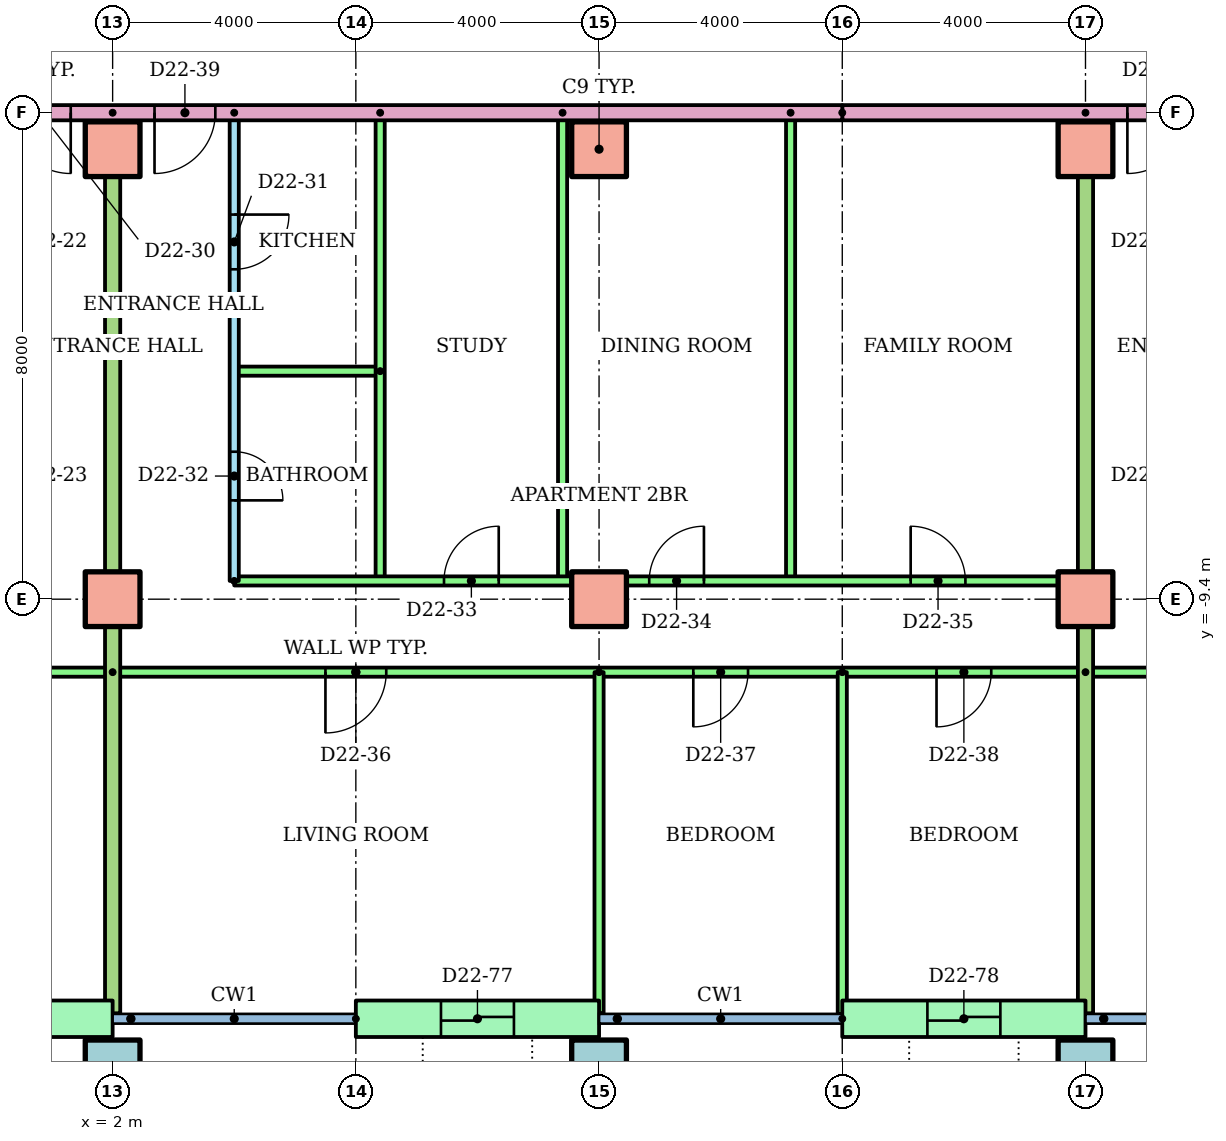
"""IFC4 building model, lengths in metres.
Left out: names, types, materials, properties, quantities, classifications, styles, units other than length and angle.
Written with IfcOpenShell. Run it as: python <this file> out.ifc"""

import sys

from ifc_helpers import new_model, si_unit, direction, frame, frame_2d, origin, origin_2d, place, context, subcontext, project, spatial, rectangle, hollow_rectangle, extrude, element, fill, save


model = new_model("IFC4")
c1 = context("Model", 3, precision=1e-05, world=origin(), true_north=direction((0.0, 1.0)))
c2 = subcontext(c1, "Body", "Model", "MODEL_VIEW")
j1 = project(units=[si_unit("LENGTHUNIT", "METRE"), si_unit("PLANEANGLEUNIT", "RADIAN")], contexts=[c1])
p1 = place(None, origin())
s1 = spatial("IfcSite", under=j1, at=p1, CompositionType="ELEMENT")
p2 = place(p1, origin())
s2 = spatial("IfcBuilding", under=s1, at=p2, CompositionType="ELEMENT")
p3 = place(p2, frame((0.0, 0.0, 87.1)))
s3 = spatial("IfcBuildingStorey", under=s2, at=p3, CompositionType="ELEMENT", Elevation=87.1)
for number, where in (
    (1, (2.0, -17.1, 0.0)),
    (2, (10.0, -17.1, 0.0)),
    (3, (18.0, -17.1, 0.0)),
):
    element("IfcColumn", number, at=place(p3, frame(where)), inside=s3, PredefinedType="COLUMN", context=c2, shape_type="SweptSolid", body=[
        extrude(hollow_rectangle(XDim=0.9, YDim=0.9, WallThickness=0.045, at=origin_2d()), origin(), (0.0, 0.0, 1.0), 3.2),
    ])
for number, where in (
    (4, (2.0, -9.4, 0.0)),
    (5, (10.0, -9.4, 0.0)),
    (6, (18.0, -9.4, 0.0)),
    (7, (2.0, -2.0, 0.0)),
    (8, (10.0, -2.0, 0.0)),
    (9, (18.0, -2.0, 0.0)),
):
    element("IfcColumn", number, at=place(p3, frame(where)), inside=s3, PredefinedType="COLUMN", context=c2, shape_type="SweptSolid", body=[
        extrude(rectangle(XDim=0.9, YDim=0.9, at=origin_2d()), origin(), (0.0, 0.0, 1.0), 3.2),
    ])
p4 = place(p3, frame((-2.0, -16.3, 0.0)))
e10 = element("IfcWall", 10, at=p4, inside=s3, PredefinedType="STANDARD", context=c2, shape_type="SweptSolid", body=[
    extrude(rectangle(XDim=4.0, YDim=0.6, at=frame_2d((2.0, 0.0))), origin(), (0.0, 0.0, 1.0), 2.92),
])
p5 = place(p4, frame((1.4, 0.0, 0.0)))
e11 = element("IfcOpeningElement", 11, at=p5, cuts=e10, PredefinedType="OPENING", context=c2, shape_type="SweptSolid", body=[
    extrude(rectangle(XDim=1.2, YDim=2.1, at=frame_2d((0.6, 1.05))), frame((0.0, 0.31, 0.0), z_axis=(0.0, -1.0, 0.0), x_axis=(1.0, 0.0, 0.0)), (0.0, 0.0, 1.0), 0.62),
])
p6 = place(p3, frame((6.0, -16.3, 0.0)))
e12 = element("IfcWall", 12, at=p6, inside=s3, PredefinedType="STANDARD", context=c2, shape_type="SweptSolid", body=[
    extrude(rectangle(XDim=4.0, YDim=0.6, at=frame_2d((2.0, 0.0))), origin(), (0.0, 0.0, 1.0), 2.92),
])
p7 = place(p6, frame((1.4, 0.0, 0.0)))
e13 = element("IfcOpeningElement", 13, at=p7, cuts=e12, PredefinedType="OPENING", context=c2, shape_type="SweptSolid", body=[
    extrude(rectangle(XDim=1.2, YDim=2.1, at=frame_2d((0.6, 1.05))), frame((0.0, 0.31, 0.0), z_axis=(0.0, -1.0, 0.0), x_axis=(1.0, 0.0, 0.0)), (0.0, 0.0, 1.0), 0.62),
])
p8 = place(p3, frame((14.0, -16.3, 0.0)))
e14 = element("IfcWall", 14, at=p8, inside=s3, PredefinedType="STANDARD", context=c2, shape_type="SweptSolid", body=[
    extrude(rectangle(XDim=4.0, YDim=0.6, at=frame_2d((2.0, 0.0))), origin(), (0.0, 0.0, 1.0), 2.92),
])
p9 = place(p8, frame((1.4, 0.0, 0.0)))
e15 = element("IfcOpeningElement", 15, at=p9, cuts=e14, PredefinedType="OPENING", context=c2, shape_type="SweptSolid", body=[
    extrude(rectangle(XDim=1.2, YDim=2.1, at=frame_2d((0.6, 1.05))), frame((0.0, 0.31, 0.0), z_axis=(0.0, -1.0, 0.0), x_axis=(1.0, 0.0, 0.0)), (0.0, 0.0, 1.0), 0.62),
])
p10 = place(p3, frame((2.0, -10.6, 0.0), z_axis=(0.0, 0.0, 1.0), x_axis=(-1.0, 0.0, 0.0)))
e16 = element("IfcWall", 16, at=p10, inside=s3, PredefinedType="PARTITIONING", context=c2, shape_type="SweptSolid", body=[
    extrude(rectangle(XDim=16.0, YDim=0.15, at=frame_2d((8.0, 0.0))), origin(), (0.0, 0.0, 1.0), 2.4),
])
p11 = place(p10, frame((13.55, 0.0, 0.0)))
e17 = element("IfcOpeningElement", 17, at=p11, cuts=e16, PredefinedType="OPENING", context=c2, shape_type="SweptSolid", body=[
    extrude(rectangle(XDim=0.9, YDim=2.1, at=frame_2d((0.45, 1.05))), frame((0.0, 0.085, 0.0), z_axis=(0.0, -1.0, 0.0), x_axis=(1.0, 0.0, 0.0)), (0.0, 0.0, 1.0), 0.17),
])
p12 = place(p10, frame((9.55, 0.0, 0.0)))
e18 = element("IfcOpeningElement", 18, at=p12, cuts=e16, PredefinedType="OPENING", context=c2, shape_type="SweptSolid", body=[
    extrude(rectangle(XDim=0.9, YDim=2.1, at=frame_2d((0.45, 1.05))), frame((0.0, 0.085, 0.0), z_axis=(0.0, -1.0, 0.0), x_axis=(1.0, 0.0, 0.0)), (0.0, 0.0, 1.0), 0.17),
])
p13 = place(p10, frame((3.5, 0.0, 0.0)))
e19 = element("IfcOpeningElement", 19, at=p13, cuts=e16, PredefinedType="OPENING", context=c2, shape_type="SweptSolid", body=[
    extrude(rectangle(XDim=1.0, YDim=2.1, at=frame_2d((0.5, 1.05))), frame((0.0, 0.085, 0.0), z_axis=(0.0, -1.0, 0.0), x_axis=(1.0, 0.0, 0.0)), (0.0, 0.0, 1.0), 0.17),
])
p14 = place(p3, frame((4.0, -1.4, 0.0), z_axis=(0.0, 0.0, 1.0), x_axis=(0.0, -1.0, 0.0)))
e20 = element("IfcWall", 20, at=p14, inside=s3, PredefinedType="PARTITIONING", context=c2, shape_type="SweptSolid", body=[
    extrude(rectangle(XDim=7.7, YDim=0.15, at=frame_2d((3.85, 0.0))), origin(), (0.0, 0.0, 1.0), 2.4),
])
p15 = place(p14, frame((1.675, 0.0, 0.0)))
e21 = element("IfcOpeningElement", 21, at=p15, cuts=e20, PredefinedType="OPENING", context=c2, shape_type="SweptSolid", body=[
    extrude(rectangle(XDim=0.9, YDim=2.1, at=frame_2d((0.45, 1.05))), frame((0.0, 0.085, 0.0), z_axis=(0.0, -1.0, 0.0), x_axis=(1.0, 0.0, 0.0)), (0.0, 0.0, 1.0), 0.17),
])
p16 = place(p14, frame((5.575, 0.0, 0.0)))
e22 = element("IfcOpeningElement", 22, at=p16, cuts=e20, PredefinedType="OPENING", context=c2, shape_type="SweptSolid", body=[
    extrude(rectangle(XDim=0.8, YDim=2.1, at=frame_2d((0.4, 1.05))), frame((0.0, 0.085, 0.0), z_axis=(0.0, -1.0, 0.0), x_axis=(1.0, 0.0, 0.0)), (0.0, 0.0, 1.0), 0.17),
])
p17 = place(p3, frame((6.4, -5.65, 0.0), z_axis=(0.0, 0.0, 1.0), x_axis=(-1.0, 0.0, 0.0)))
e23 = element("IfcWall", 23, at=p17, inside=s3, PredefinedType="PARTITIONING", context=c2, shape_type="SweptSolid", body=[
    extrude(rectangle(XDim=2.4, YDim=0.15, at=frame_2d((1.2, 0.0))), origin(), (0.0, 0.0, 1.0), 2.4),
])
for number, where, z_axis, x_axis in (
    (24, (6.4, -1.4, 0.0), (0.0, 0.0, 1.0), (0.0, -1.0, 0.0)),
    (25, (9.4, -1.4, 0.0), (0.0, 0.0, 1.0), (0.0, -1.0, 0.0)),
    (26, (13.15, -1.4, 0.0), (0.0, 0.0, 1.0), (0.0, -1.0, 0.0)),
):
    element("IfcWall", number, at=place(p3, frame(where, z_axis=z_axis, x_axis=x_axis)), inside=s3, PredefinedType="PARTITIONING", context=c2, shape_type="SweptSolid", body=[
        extrude(rectangle(XDim=7.7, YDim=0.15, at=frame_2d((3.85, 0.0))), origin(), (0.0, 0.0, 1.0), 2.4),
    ])
p18 = place(p3, frame((4.0, -9.1, 0.0)))
e27 = element("IfcWall", 27, at=p18, inside=s3, PredefinedType="PARTITIONING", context=c2, shape_type="SweptSolid", body=[
    extrude(rectangle(XDim=14.0, YDim=0.15, at=frame_2d((7.0, 0.0))), origin(), (0.0, 0.0, 1.0), 2.4),
])
p19 = place(p18, frame((3.45, 0.0, 0.0)))
e28 = element("IfcOpeningElement", 28, at=p19, cuts=e27, PredefinedType="OPENING", context=c2, shape_type="SweptSolid", body=[
    extrude(rectangle(XDim=0.9, YDim=2.1, at=frame_2d((0.45, 1.05))), frame((0.0, 0.085, 0.0), z_axis=(0.0, -1.0, 0.0), x_axis=(1.0, 0.0, 0.0)), (0.0, 0.0, 1.0), 0.17),
])
p20 = place(p18, frame((6.825, 0.0, 0.0)))
e29 = element("IfcOpeningElement", 29, at=p20, cuts=e27, PredefinedType="OPENING", context=c2, shape_type="SweptSolid", body=[
    extrude(rectangle(XDim=0.9, YDim=2.1, at=frame_2d((0.45, 1.05))), frame((0.0, 0.085, 0.0), z_axis=(0.0, -1.0, 0.0), x_axis=(1.0, 0.0, 0.0)), (0.0, 0.0, 1.0), 0.17),
])
p21 = place(p18, frame((11.125, 0.0, 0.0)))
e30 = element("IfcOpeningElement", 30, at=p21, cuts=e27, PredefinedType="OPENING", context=c2, shape_type="SweptSolid", body=[
    extrude(rectangle(XDim=0.9, YDim=2.1, at=frame_2d((0.45, 1.05))), frame((0.0, 0.085, 0.0), z_axis=(0.0, -1.0, 0.0), x_axis=(1.0, 0.0, 0.0)), (0.0, 0.0, 1.0), 0.17),
])
p22 = place(p3, frame((18.0, -10.6, 0.0), z_axis=(0.0, 0.0, 1.0), x_axis=(-1.0, 0.0, 0.0)))
e31 = element("IfcWall", 31, at=p22, inside=s3, PredefinedType="PARTITIONING", context=c2, shape_type="SweptSolid", body=[
    extrude(rectangle(XDim=16.0, YDim=0.15, at=frame_2d((8.0, 0.0))), origin(), (0.0, 0.0, 1.0), 2.4),
])
p23 = place(p22, frame((11.5, 0.0, 0.0)))
e32 = element("IfcOpeningElement", 32, at=p23, cuts=e31, PredefinedType="OPENING", context=c2, shape_type="SweptSolid", body=[
    extrude(rectangle(XDim=1.0, YDim=2.1, at=frame_2d((0.5, 1.05))), frame((0.0, 0.085, 0.0), z_axis=(0.0, -1.0, 0.0), x_axis=(1.0, 0.0, 0.0)), (0.0, 0.0, 1.0), 0.17),
])
p24 = place(p22, frame((5.55, 0.0, 0.0)))
e33 = element("IfcOpeningElement", 33, at=p24, cuts=e31, PredefinedType="OPENING", context=c2, shape_type="SweptSolid", body=[
    extrude(rectangle(XDim=0.9, YDim=2.1, at=frame_2d((0.45, 1.05))), frame((0.0, 0.085, 0.0), z_axis=(0.0, -1.0, 0.0), x_axis=(1.0, 0.0, 0.0)), (0.0, 0.0, 1.0), 0.17),
])
p25 = place(p22, frame((1.55, 0.0, 0.0)))
e34 = element("IfcOpeningElement", 34, at=p25, cuts=e31, PredefinedType="OPENING", context=c2, shape_type="SweptSolid", body=[
    extrude(rectangle(XDim=0.9, YDim=2.1, at=frame_2d((0.45, 1.05))), frame((0.0, 0.085, 0.0), z_axis=(0.0, -1.0, 0.0), x_axis=(1.0, 0.0, 0.0)), (0.0, 0.0, 1.0), 0.17),
])
p26 = place(p3, frame((10.0, -10.6, 0.0), z_axis=(0.0, 0.0, 1.0), x_axis=(0.0, -1.0, 0.0)))
e35 = element("IfcWall", 35, at=p26, inside=s3, PredefinedType="PARTITIONING", context=c2, shape_type="SweptSolid", body=[
    extrude(rectangle(XDim=5.61, YDim=0.15, at=frame_2d((2.805, 0.0))), origin(), (0.0, 0.0, 1.0), 2.4),
])
p27 = place(p3, frame((14.0, -10.6, 0.0), z_axis=(0.0, 0.0, 1.0), x_axis=(0.0, -1.0, 0.0)))
e36 = element("IfcWall", 36, at=p27, inside=s3, PredefinedType="PARTITIONING", context=c2, shape_type="SweptSolid", body=[
    extrude(rectangle(XDim=5.621, YDim=0.15, at=frame_2d((2.811, 0.0))), origin(), (0.0, 0.0, 1.0), 2.4),
])
p28 = place(p3, frame((2.0, -1.4, 0.0), z_axis=(0.0, 0.0, 1.0), x_axis=(0.0, -1.0, 0.0)))
e37 = element("IfcWall", 37, at=p28, inside=s3, PredefinedType="PARTITIONING", context=c2, shape_type="SweptSolid", body=[
    extrude(rectangle(XDim=14.81, YDim=0.25, at=frame_2d((7.405, 0.0))), origin(), (0.0, 0.0, 1.0), 2.4),
])
p29 = place(p3, frame((40.62, -10.6, 0.0), z_axis=(0.0, 0.0, 1.0), x_axis=(-1.0, 0.0, 0.0)))
e38 = element("IfcWall", 38, at=p29, inside=s3, PredefinedType="PARTITIONING", context=c2, shape_type="SweptSolid", body=[
    extrude(rectangle(XDim=22.62, YDim=0.15, at=frame_2d((11.31, 0.0))), origin(), (0.0, 0.0, 1.0), 2.4),
])
p30 = place(p29, frame((18.12, 0.0, 0.0)))
e39 = element("IfcOpeningElement", 39, at=p30, cuts=e38, PredefinedType="OPENING", context=c2, shape_type="SweptSolid", body=[
    extrude(rectangle(XDim=1.0, YDim=2.1, at=frame_2d((0.5, 1.05))), frame((0.0, 0.085, 0.0), z_axis=(0.0, -1.0, 0.0), x_axis=(1.0, 0.0, 0.0)), (0.0, 0.0, 1.0), 0.17),
])
p31 = place(p29, frame((12.17, 0.0, 0.0)))
e40 = element("IfcOpeningElement", 40, at=p31, cuts=e38, PredefinedType="OPENING", context=c2, shape_type="SweptSolid", body=[
    extrude(rectangle(XDim=0.9, YDim=2.1, at=frame_2d((0.45, 1.05))), frame((0.0, 0.085, 0.0), z_axis=(0.0, -1.0, 0.0), x_axis=(1.0, 0.0, 0.0)), (0.0, 0.0, 1.0), 0.17),
])
p32 = place(p29, frame((8.17, 0.0, 0.0)))
e41 = element("IfcOpeningElement", 41, at=p32, cuts=e38, PredefinedType="OPENING", context=c2, shape_type="SweptSolid", body=[
    extrude(rectangle(XDim=0.9, YDim=2.1, at=frame_2d((0.45, 1.05))), frame((0.0, 0.085, 0.0), z_axis=(0.0, -1.0, 0.0), x_axis=(1.0, 0.0, 0.0)), (0.0, 0.0, 1.0), 0.17),
])
p33 = place(p29, frame((2.97, 0.0, 0.0)))
e42 = element("IfcOpeningElement", 42, at=p33, cuts=e38, PredefinedType="OPENING", context=c2, shape_type="SweptSolid", body=[
    extrude(rectangle(XDim=0.9, YDim=2.1, at=frame_2d((0.45, 1.05))), frame((0.0, 0.085, 0.0), z_axis=(0.0, -1.0, 0.0), x_axis=(1.0, 0.0, 0.0)), (0.0, 0.0, 1.0), 0.17),
])
p34 = place(p3, frame((18.0, -1.4, 0.0), z_axis=(0.0, 0.0, 1.0), x_axis=(0.0, -1.0, 0.0)))
e43 = element("IfcWall", 43, at=p34, inside=s3, PredefinedType="PARTITIONING", context=c2, shape_type="SweptSolid", body=[
    extrude(rectangle(XDim=14.81, YDim=0.25, at=frame_2d((7.405, 0.0))), origin(), (0.0, 0.0, 1.0), 2.4),
])
p35 = place(p3, frame((29.0, -1.4, 0.0), z_axis=(0.0, 0.0, 1.0), x_axis=(-1.0, 0.0, 0.0)))
e44 = element("IfcWall", 44, at=p35, inside=s3, PredefinedType="PARTITIONING", context=c2, shape_type="SweptSolid", body=[
    extrude(rectangle(XDim=15.0, YDim=0.25, at=frame_2d((7.5, 0.0))), origin(), (0.0, 0.0, 1.0), 2.4),
])
p36 = place(p35, frame((9.311, 0.0, 0.0)))
e45 = element("IfcOpeningElement", 45, at=p36, cuts=e44, PredefinedType="OPENING", context=c2, shape_type="SweptSolid", body=[
    extrude(rectangle(XDim=1.0, YDim=2.1, at=frame_2d((0.5, 1.05))), frame((0.0, 0.135, 0.0), z_axis=(0.0, -1.0, 0.0), x_axis=(1.0, 0.0, 0.0)), (0.0, 0.0, 1.0), 0.27),
])
p37 = place(p3, frame((14.0, -1.4, 0.0), z_axis=(0.0, 0.0, 1.0), x_axis=(-1.0, 0.0, 0.0)))
e46 = element("IfcWall", 46, at=p37, inside=s3, PredefinedType="PARTITIONING", context=c2, shape_type="SweptSolid", body=[
    extrude(rectangle(XDim=28.0, YDim=0.25, at=frame_2d((14.0, 0.0))), origin(), (0.0, 0.0, 1.0), 2.4),
])
p38 = place(p37, frame((12.689, 0.0, 0.0)))
e47 = element("IfcOpeningElement", 47, at=p38, cuts=e46, PredefinedType="OPENING", context=c2, shape_type="SweptSolid", body=[
    extrude(rectangle(XDim=1.0, YDim=2.1, at=frame_2d((0.5, 1.05))), frame((0.0, 0.135, 0.0), z_axis=(0.0, -1.0, 0.0), x_axis=(1.0, 0.0, 0.0)), (0.0, 0.0, 1.0), 0.27),
])
p39 = place(p37, frame((10.311, 0.0, 0.0)))
e48 = element("IfcOpeningElement", 48, at=p39, cuts=e46, PredefinedType="OPENING", context=c2, shape_type="SweptSolid", body=[
    extrude(rectangle(XDim=1.0, YDim=2.1, at=frame_2d((0.5, 1.05))), frame((0.0, 0.135, 0.0), z_axis=(0.0, -1.0, 0.0), x_axis=(1.0, 0.0, 0.0)), (0.0, 0.0, 1.0), 0.27),
])
p40 = place(p38, origin())
e49 = element("IfcDoor", 49, at=p40, inside=s3, OperationType="SINGLE_SWING_LEFT", PredefinedType="DOOR", context=c2, shape_type="SweptSolid", body=[
    extrude(rectangle(XDim=1.0, YDim=2.1, at=frame_2d((0.5, 1.05))), frame((0.0, 0.025, 0.0), z_axis=(0.0, -1.0, 0.0), x_axis=(1.0, 0.0, 0.0)), (0.0, 0.0, 1.0), 0.05),
])
fill(e47, e49)
p41 = place(p15, origin())
e50 = element("IfcDoor", 50, at=p41, inside=s3, OperationType="SINGLE_SWING_LEFT", PredefinedType="DOOR", context=c2, shape_type="SweptSolid", body=[
    extrude(rectangle(XDim=0.9, YDim=2.1, at=frame_2d((0.45, 1.05))), frame((0.0, 0.025, 0.0), z_axis=(0.0, -1.0, 0.0), x_axis=(1.0, 0.0, 0.0)), (0.0, 0.0, 1.0), 0.05),
])
fill(e21, e50)
p42 = place(p16, origin())
e51 = element("IfcDoor", 51, at=p42, inside=s3, OperationType="SINGLE_SWING_RIGHT", PredefinedType="DOOR", context=c2, shape_type="SweptSolid", body=[
    extrude(rectangle(XDim=0.8, YDim=2.1, at=frame_2d((0.4, 1.05))), frame((0.0, 0.025, 0.0), z_axis=(0.0, -1.0, 0.0), x_axis=(1.0, 0.0, 0.0)), (0.0, 0.0, 1.0), 0.05),
])
fill(e22, e51)
p43 = place(p19, origin())
e52 = element("IfcDoor", 52, at=p43, inside=s3, OperationType="SINGLE_SWING_RIGHT", PredefinedType="DOOR", context=c2, shape_type="SweptSolid", body=[
    extrude(rectangle(XDim=0.9, YDim=2.1, at=frame_2d((0.45, 1.05))), frame((0.0, 0.025, 0.0), z_axis=(0.0, -1.0, 0.0), x_axis=(1.0, 0.0, 0.0)), (0.0, 0.0, 1.0), 0.05),
])
fill(e28, e52)
p44 = place(p20, origin())
e53 = element("IfcDoor", 53, at=p44, inside=s3, OperationType="SINGLE_SWING_RIGHT", PredefinedType="DOOR", context=c2, shape_type="SweptSolid", body=[
    extrude(rectangle(XDim=0.9, YDim=2.1, at=frame_2d((0.45, 1.05))), frame((0.0, 0.025, 0.0), z_axis=(0.0, -1.0, 0.0), x_axis=(1.0, 0.0, 0.0)), (0.0, 0.0, 1.0), 0.05),
])
fill(e29, e53)
p45 = place(p21, origin())
e54 = element("IfcDoor", 54, at=p45, inside=s3, OperationType="SINGLE_SWING_LEFT", PredefinedType="DOOR", context=c2, shape_type="SweptSolid", body=[
    extrude(rectangle(XDim=0.9, YDim=2.1, at=frame_2d((0.45, 1.05))), frame((0.0, 0.025, 0.0), z_axis=(0.0, -1.0, 0.0), x_axis=(1.0, 0.0, 0.0)), (0.0, 0.0, 1.0), 0.05),
])
fill(e30, e54)
p46 = place(p23, origin())
e55 = element("IfcDoor", 55, at=p46, inside=s3, OperationType="SINGLE_SWING_RIGHT", PredefinedType="DOOR", context=c2, shape_type="SweptSolid", body=[
    extrude(rectangle(XDim=1.0, YDim=2.1, at=frame_2d((0.5, 1.05))), frame((0.0, 0.025, 0.0), z_axis=(0.0, -1.0, 0.0), x_axis=(1.0, 0.0, 0.0)), (0.0, 0.0, 1.0), 0.05),
])
fill(e32, e55)
p47 = place(p24, origin())
e56 = element("IfcDoor", 56, at=p47, inside=s3, OperationType="SINGLE_SWING_RIGHT", PredefinedType="DOOR", context=c2, shape_type="SweptSolid", body=[
    extrude(rectangle(XDim=0.9, YDim=2.1, at=frame_2d((0.45, 1.05))), frame((0.0, 0.025, 0.0), z_axis=(0.0, -1.0, 0.0), x_axis=(1.0, 0.0, 0.0)), (0.0, 0.0, 1.0), 0.05),
])
fill(e33, e56)
p48 = place(p25, origin())
e57 = element("IfcDoor", 57, at=p48, inside=s3, OperationType="SINGLE_SWING_RIGHT", PredefinedType="DOOR", context=c2, shape_type="SweptSolid", body=[
    extrude(rectangle(XDim=0.9, YDim=2.1, at=frame_2d((0.45, 1.05))), frame((0.0, 0.025, 0.0), z_axis=(0.0, -1.0, 0.0), x_axis=(1.0, 0.0, 0.0)), (0.0, 0.0, 1.0), 0.05),
])
fill(e34, e57)
p49 = place(p39, origin())
e58 = element("IfcDoor", 58, at=p49, inside=s3, OperationType="SINGLE_SWING_RIGHT", PredefinedType="DOOR", context=c2, shape_type="SweptSolid", body=[
    extrude(rectangle(XDim=1.0, YDim=2.1, at=frame_2d((0.5, 1.05))), frame((0.0, 0.025, 0.0), z_axis=(0.0, -1.0, 0.0), x_axis=(1.0, 0.0, 0.0)), (0.0, 0.0, 1.0), 0.05),
])
fill(e48, e58)
p50 = place(p36, origin())
e59 = element("IfcDoor", 59, at=p50, inside=s3, OperationType="SINGLE_SWING_RIGHT", PredefinedType="DOOR", context=c2, shape_type="SweptSolid", body=[
    extrude(rectangle(XDim=1.0, YDim=2.1, at=frame_2d((0.5, 1.05))), frame((0.0, 0.025, 0.0), z_axis=(0.0, -1.0, 0.0), x_axis=(1.0, 0.0, 0.0)), (0.0, 0.0, 1.0), 0.05),
])
fill(e45, e59)
p51 = place(p7, origin())
e60 = element("IfcDoor", 60, at=p51, inside=s3, OperationType="SLIDING_TO_LEFT", PredefinedType="DOOR", context=c2, shape_type="SweptSolid", body=[
    extrude(rectangle(XDim=1.2, YDim=2.1, at=frame_2d((0.6, 1.05))), frame((0.0, 0.025, 0.0), z_axis=(0.0, -1.0, 0.0), x_axis=(1.0, 0.0, 0.0)), (0.0, 0.0, 1.0), 0.05),
])
fill(e13, e60)
p52 = place(p9, origin())
e61 = element("IfcDoor", 61, at=p52, inside=s3, OperationType="SLIDING_TO_LEFT", PredefinedType="DOOR", context=c2, shape_type="SweptSolid", body=[
    extrude(rectangle(XDim=1.2, YDim=2.1, at=frame_2d((0.6, 1.05))), frame((0.0, 0.025, 0.0), z_axis=(0.0, -1.0, 0.0), x_axis=(1.0, 0.0, 0.0)), (0.0, 0.0, 1.0), 0.05),
])
fill(e15, e61)
save(model, sys.argv[1])
